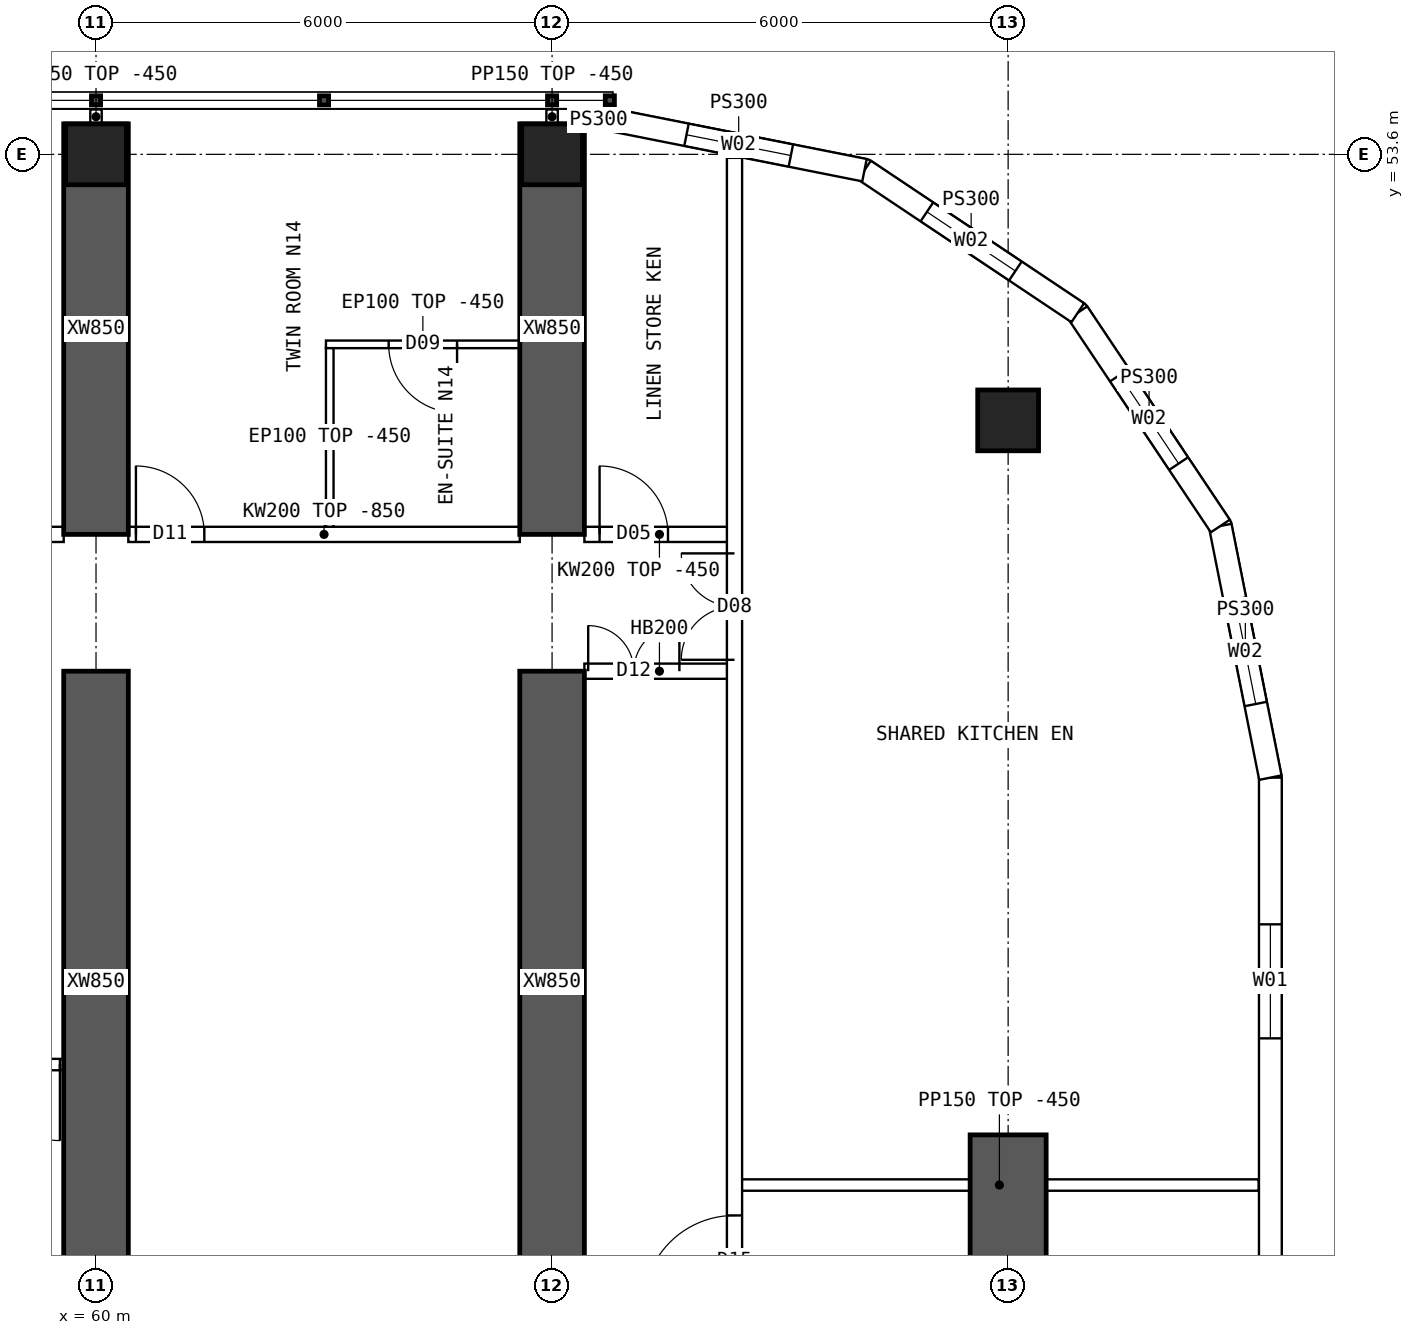
"""IFC4 building model, lengths in metres.
Left out: names, types, materials, properties, quantities, classifications, styles, units other than length and angle.
Written with IfcOpenShell. Run it as: python <this file> out.ifc"""

import sys

from ifc_helpers import new_model, si_unit, direction, frame, frame_2d, origin, origin_2d, place, context, subcontext, project, spatial, polyline, rectangle, hollow_rectangle, outline, extrude, element, fill, save


model = new_model("IFC4")
c1 = context("Model", 3, precision=1e-05, world=origin(), true_north=direction((0.0, 1.0)))
c2 = subcontext(c1, "Body", "Model", "MODEL_VIEW")
j1 = project(units=[si_unit("LENGTHUNIT", "METRE"), si_unit("PLANEANGLEUNIT", "RADIAN")], contexts=[c1])
p1 = place(None, origin())
s1 = spatial("IfcSite", under=j1, at=p1, CompositionType="ELEMENT")
p2 = place(p1, origin())
s2 = spatial("IfcBuilding", under=s1, at=p2, CompositionType="ELEMENT")
p3 = place(p2, frame((0.0, 0.0, 144.85)))
s3 = spatial("IfcBuildingStorey", under=s2, at=p3, CompositionType="ELEMENT", Elevation=144.85)
for number, where, z_axis, x_axis in (
    (1, (60.0, 53.6, 0.0), (0.0, 0.0, 1.0), (1.0, 0.0, 0.0)),
    (2, (66.0, 53.6, 0.0), (0.0, 0.0, 1.0), (1.0, 0.0, 0.0)),
    (3, (72.0, 50.1, 0.0), (0.0, 0.0, 1.0), (1.0, 0.0, 0.0)),
):
    element("IfcColumn", number, at=place(p3, frame(where, z_axis=z_axis, x_axis=x_axis)), inside=s3, PredefinedType="COLUMN", context=c2, shape_type="SweptSolid", body=[
        extrude(hollow_rectangle(XDim=0.8, YDim=0.8, WallThickness=0.08, at=origin_2d()), origin(), (0.0, 0.0, 1.0), 3.75),
    ])
p4 = place(p3, frame((72.0, 35.7, 0.0), z_axis=(0.0, 0.0, 1.0), x_axis=(0.0, 1.0, 0.0)))
e4 = element("IfcWall", 4, at=p4, inside=s3, PredefinedType="SHEAR", context=c2, shape_type="SweptSolid", body=[
    extrude(rectangle(XDim=5.0, YDim=1.0, at=frame_2d((2.5, 0.0))), origin(), (0.0, 0.0, 1.0), 3.75),
])
p5 = place(p3, frame((60.0, 48.6, 0.0), z_axis=(0.0, 0.0, 1.0), x_axis=(0.0, 1.0, 0.0)))
e5 = element("IfcWall", 5, at=p5, inside=s3, PredefinedType="SHEAR", context=c2, shape_type="SweptSolid", body=[
    extrude(rectangle(XDim=5.4, YDim=0.85, at=frame_2d((2.7, 0.0))), origin(), (0.0, 0.0, 1.0), 3.75),
])
p6 = place(p3, frame((60.0, 38.625, 0.0), z_axis=(0.0, 0.0, 1.0), x_axis=(0.0, 1.0, 0.0)))
e6 = element("IfcWall", 6, at=p6, inside=s3, PredefinedType="SHEAR", context=c2, shape_type="SweptSolid", body=[
    extrude(rectangle(XDim=8.175, YDim=0.85, at=frame_2d((4.087, 0.0))), origin(), (0.0, 0.0, 1.0), 3.75),
])
p7 = place(p3, frame((66.0, 48.6, 0.0), z_axis=(0.0, 0.0, 1.0), x_axis=(0.0, 1.0, 0.0)))
e7 = element("IfcWall", 7, at=p7, inside=s3, PredefinedType="SHEAR", context=c2, shape_type="SweptSolid", body=[
    extrude(rectangle(XDim=5.4, YDim=0.85, at=frame_2d((2.7, 0.0))), origin(), (0.0, 0.0, 1.0), 3.75),
])
p8 = place(p3, frame((66.0, 38.625, 0.0), z_axis=(0.0, 0.0, 1.0), x_axis=(0.0, 1.0, 0.0)))
e8 = element("IfcWall", 8, at=p8, inside=s3, PredefinedType="SHEAR", context=c2, shape_type="SweptSolid", body=[
    extrude(rectangle(XDim=8.175, YDim=0.85, at=frame_2d((4.087, 0.0))), origin(), (0.0, 0.0, 1.0), 3.75),
])
p9 = place(p3, frame((75.45, 18.6, 0.0), z_axis=(0.0, 0.0, 1.0), x_axis=(0.0, 1.0, 0.0)))
e9 = element("IfcWall", 9, at=p9, inside=s3, PredefinedType="SOLIDWALL", context=c2, shape_type="SweptSolid", body=[
    extrude(outline(polyline([(-0.015, -0.15), (26.815, -0.15), (26.785, 0.15), (0.015, 0.15), (-0.015, -0.15)])), origin(), (0.0, 0.0, 1.0), 3.3),
])
p10 = place(p9, frame((1.93, 0.0, 0.9)))
e10 = element("IfcOpeningElement", 10, at=p10, cuts=e9, PredefinedType="OPENING", context=c2, shape_type="SweptSolid", body=[
    extrude(rectangle(XDim=1.5, YDim=2.0, at=frame_2d((0.75, 1.0))), frame((0.0, 0.16, 0.0), z_axis=(0.0, -1.0, 0.0), x_axis=(1.0, 0.0, 0.0)), (0.0, 0.0, 1.0), 0.32),
])
p11 = place(p9, frame((7.29, 0.0, 0.9)))
e11 = element("IfcOpeningElement", 11, at=p11, cuts=e9, PredefinedType="OPENING", context=c2, shape_type="SweptSolid", body=[
    extrude(rectangle(XDim=1.5, YDim=2.0, at=frame_2d((0.75, 1.0))), frame((0.0, 0.16, 0.0), z_axis=(0.0, -1.0, 0.0), x_axis=(1.0, 0.0, 0.0)), (0.0, 0.0, 1.0), 0.32),
])
p12 = place(p9, frame((12.65, 0.0, 0.9)))
e12 = element("IfcOpeningElement", 12, at=p12, cuts=e9, PredefinedType="OPENING", context=c2, shape_type="SweptSolid", body=[
    extrude(rectangle(XDim=1.5, YDim=2.0, at=frame_2d((0.75, 1.0))), frame((0.0, 0.16, 0.0), z_axis=(0.0, -1.0, 0.0), x_axis=(1.0, 0.0, 0.0)), (0.0, 0.0, 1.0), 0.32),
])
p13 = place(p9, frame((18.01, 0.0, 0.9)))
e13 = element("IfcOpeningElement", 13, at=p13, cuts=e9, PredefinedType="OPENING", context=c2, shape_type="SweptSolid", body=[
    extrude(rectangle(XDim=1.5, YDim=2.0, at=frame_2d((0.75, 1.0))), frame((0.0, 0.16, 0.0), z_axis=(0.0, -1.0, 0.0), x_axis=(1.0, 0.0, 0.0)), (0.0, 0.0, 1.0), 0.32),
])
p14 = place(p9, frame((23.37, 0.0, 0.9)))
e14 = element("IfcOpeningElement", 14, at=p14, cuts=e9, PredefinedType="OPENING", context=c2, shape_type="SweptSolid", body=[
    extrude(rectangle(XDim=1.5, YDim=2.0, at=frame_2d((0.75, 1.0))), frame((0.0, 0.16, 0.0), z_axis=(0.0, -1.0, 0.0), x_axis=(1.0, 0.0, 0.0)), (0.0, 0.0, 1.0), 0.32),
])
p15 = place(p3, frame((75.45, 45.4, 0.0), z_axis=(0.0, 0.0, 1.0), x_axis=(-0.19508664885, 0.980786011034, 0.0)))
e15 = element("IfcWall", 15, at=p15, inside=s3, PredefinedType="SOLIDWALL", context=c2, shape_type="SweptSolid", body=[
    extrude(outline(polyline([(-0.015, -0.15), (3.405, -0.15), (3.345, 0.15), (0.015, 0.15), (-0.015, -0.15)])), origin(), (0.0, 0.0, 1.0), 3.3),
])
p16 = place(p15, frame((0.988, 0.0, 0.9)))
e16 = element("IfcOpeningElement", 16, at=p16, cuts=e15, PredefinedType="OPENING", context=c2, shape_type="SweptSolid", body=[
    extrude(rectangle(XDim=1.4, YDim=1.8, at=frame_2d((0.7, 0.9))), frame((0.0, 0.16, 0.0), z_axis=(0.0, -1.0, 0.0), x_axis=(1.0, 0.0, 0.0)), (0.0, 0.0, 1.0), 0.32),
])
p17 = place(p3, frame((74.792, 48.71, 0.0), z_axis=(0.0, 0.0, 1.0), x_axis=(-0.555534554399, 0.831493450887, 0.0)))
e17 = element("IfcWall", 17, at=p17, inside=s3, PredefinedType="SOLIDWALL", context=c2, shape_type="SweptSolid", body=[
    extrude(outline(polyline([(-0.03, -0.15), (3.405, -0.15), (3.345, 0.15), (0.03, 0.15), (-0.03, -0.15)])), origin(), (0.0, 0.0, 1.0), 3.3),
])
p18 = place(p17, frame((0.988, 0.0, 0.9)))
e18 = element("IfcOpeningElement", 18, at=p18, cuts=e17, PredefinedType="OPENING", context=c2, shape_type="SweptSolid", body=[
    extrude(rectangle(XDim=1.4, YDim=1.8, at=frame_2d((0.7, 0.9))), frame((0.0, 0.16, 0.0), z_axis=(0.0, -1.0, 0.0), x_axis=(1.0, 0.0, 0.0)), (0.0, 0.0, 1.0), 0.32),
])
p19 = place(p3, frame((72.917, 51.517, 0.0), z_axis=(0.0, 0.0, 1.0), x_axis=(-0.831493450887, 0.555534554399, 0.0)))
e19 = element("IfcWall", 19, at=p19, inside=s3, PredefinedType="SOLIDWALL", context=c2, shape_type="SweptSolid", body=[
    extrude(outline(polyline([(-0.03, -0.15), (3.405, -0.15), (3.345, 0.15), (0.03, 0.15), (-0.03, -0.15)])), origin(), (0.0, 0.0, 1.0), 3.3),
])
p20 = place(p19, frame((0.988, 0.0, 0.9)))
e20 = element("IfcOpeningElement", 20, at=p20, cuts=e19, PredefinedType="OPENING", context=c2, shape_type="SweptSolid", body=[
    extrude(rectangle(XDim=1.4, YDim=1.8, at=frame_2d((0.7, 0.9))), frame((0.0, 0.16, 0.0), z_axis=(0.0, -1.0, 0.0), x_axis=(1.0, 0.0, 0.0)), (0.0, 0.0, 1.0), 0.32),
])
p21 = place(p3, frame((70.11, 53.392, 0.0), z_axis=(0.0, 0.0, 1.0), x_axis=(-0.98078325777, 0.195100490205, 0.0)))
e21 = element("IfcWall", 21, at=p21, inside=s3, PredefinedType="SOLIDWALL", context=c2, shape_type="SweptSolid", body=[
    extrude(outline(polyline([(-0.03, -0.15), (3.405, -0.15), (3.345, 0.15), (0.03, 0.15), (-0.03, -0.15)])), origin(), (0.0, 0.0, 1.0), 3.3),
])
p22 = place(p21, frame((0.988, 0.0, 0.9)))
e22 = element("IfcOpeningElement", 22, at=p22, cuts=e21, PredefinedType="OPENING", context=c2, shape_type="SweptSolid", body=[
    extrude(rectangle(XDim=1.4, YDim=1.8, at=frame_2d((0.7, 0.9))), frame((0.0, 0.16, 0.0), z_axis=(0.0, -1.0, 0.0), x_axis=(1.0, 0.0, 0.0)), (0.0, 0.0, 1.0), 0.32),
])
p23 = place(p3, frame((66.8, 54.05, 0.0), z_axis=(0.0, 0.0, 1.0), x_axis=(-1.0, 0.0, 0.0)))
e23 = element("IfcWall", 23, at=p23, inside=s3, PredefinedType="SOLIDWALL", context=c2, shape_type="SweptSolid", body=[
    extrude(rectangle(XDim=0.375, YDim=0.3, at=frame_2d((0.188, 0.0))), origin(), (0.0, 0.0, 1.0), 3.3),
])
p24 = place(p3, frame((54.425, 48.6, 0.0), z_axis=(0.0, 0.0, 1.0), x_axis=(1.0, 0.0, 0.0)))
e24 = element("IfcWall", 24, at=p24, inside=s3, PredefinedType="SOLIDWALL", context=c2, shape_type="SweptSolid", body=[
    extrude(outline(polyline([(0.0, 0.0), (5.15, 0.0), (5.15, 2.9), (0.0, 2.9), (0.0, 0.0)])), frame((0.0, 0.1, 0.0), z_axis=(0.0, -1.0, 0.0), x_axis=(1.0, 0.0, 0.0)), (0.0, 0.0, 1.0), 0.2),
])
p25 = place(p24, frame((0.6, 0.0, 0.0)))
e25 = element("IfcOpeningElement", 25, at=p25, cuts=e24, PredefinedType="OPENING", context=c2, shape_type="SweptSolid", body=[
    extrude(rectangle(XDim=1.0, YDim=2.1, at=frame_2d((0.5, 1.05))), frame((0.0, 0.11, 0.0), z_axis=(0.0, -1.0, 0.0), x_axis=(1.0, 0.0, 0.0)), (0.0, 0.0, 1.0), 0.22),
])
p26 = place(p3, frame((60.425, 48.6, 0.0), z_axis=(0.0, 0.0, 1.0), x_axis=(1.0, 0.0, 0.0)))
e26 = element("IfcWall", 26, at=p26, inside=s3, PredefinedType="SOLIDWALL", context=c2, shape_type="SweptSolid", body=[
    extrude(outline(polyline([(0.0, 0.0), (5.15, 0.0), (5.15, 2.9), (0.0, 2.9), (0.0, 0.0)])), frame((0.0, 0.1, 0.0), z_axis=(0.0, -1.0, 0.0), x_axis=(1.0, 0.0, 0.0)), (0.0, 0.0, 1.0), 0.2),
])
p27 = place(p26, frame((0.1, 0.0, 0.0)))
e27 = element("IfcOpeningElement", 27, at=p27, cuts=e26, PredefinedType="OPENING", context=c2, shape_type="SweptSolid", body=[
    extrude(rectangle(XDim=0.9, YDim=2.1, at=frame_2d((0.45, 1.05))), frame((0.0, 0.11, 0.0), z_axis=(0.0, -1.0, 0.0), x_axis=(1.0, 0.0, 0.0)), (0.0, 0.0, 1.0), 0.22),
])
p28 = place(p3, frame((66.425, 48.6, 0.0), z_axis=(0.0, 0.0, 1.0), x_axis=(1.0, 0.0, 0.0)))
e28 = element("IfcWall", 28, at=p28, inside=s3, PredefinedType="SOLIDWALL", context=c2, shape_type="SweptSolid", body=[
    extrude(rectangle(XDim=1.975, YDim=0.2, at=frame_2d((0.987, 0.0))), origin(), (0.0, 0.0, 1.0), 3.3),
])
p29 = place(p28, frame((0.2, 0.0, 0.0)))
e29 = element("IfcOpeningElement", 29, at=p29, cuts=e28, PredefinedType="OPENING", context=c2, shape_type="SweptSolid", body=[
    extrude(rectangle(XDim=0.9, YDim=2.1, at=frame_2d((0.45, 1.05))), frame((0.0, 0.11, 0.0), z_axis=(0.0, -1.0, 0.0), x_axis=(1.0, 0.0, 0.0)), (0.0, 0.0, 1.0), 0.22),
])
p30 = place(p3, frame((66.425, 46.8, 0.0), z_axis=(0.0, 0.0, 1.0), x_axis=(1.0, 0.0, 0.0)))
e30 = element("IfcWall", 30, at=p30, inside=s3, PredefinedType="SOLIDWALL", context=c2, shape_type="SweptSolid", body=[
    extrude(rectangle(XDim=1.975, YDim=0.2, at=frame_2d((0.987, 0.0))), origin(), (0.0, 0.0, 1.0), 3.3),
])
p31 = place(p30, frame((0.05, 0.0, 0.0)))
e31 = element("IfcOpeningElement", 31, at=p31, cuts=e30, PredefinedType="OPENING", context=c2, shape_type="SweptSolid", body=[
    extrude(rectangle(XDim=1.2, YDim=2.1, at=frame_2d((0.6, 1.05))), frame((0.0, 0.11, 0.0), z_axis=(0.0, -1.0, 0.0), x_axis=(1.0, 0.0, 0.0)), (0.0, 0.0, 1.0), 0.22),
])
p32 = place(p3, frame((63.025, 51.1, 0.0), z_axis=(0.0, 0.0, 1.0), x_axis=(1.0, 0.0, 0.0)))
e32 = element("IfcWall", 32, at=p32, inside=s3, PredefinedType="PARTITIONING", context=c2, shape_type="SweptSolid", body=[
    extrude(rectangle(XDim=2.55, YDim=0.1, at=frame_2d((1.275, 0.0))), origin(), (0.0, 0.0, 1.0), 3.3),
])
p33 = place(p32, frame((0.825, 0.0, 0.0)))
e33 = element("IfcOpeningElement", 33, at=p33, cuts=e32, PredefinedType="OPENING", context=c2, shape_type="SweptSolid", body=[
    extrude(rectangle(XDim=0.9, YDim=2.1, at=frame_2d((0.45, 1.05))), frame((0.0, 0.06, 0.0), z_axis=(0.0, -1.0, 0.0), x_axis=(1.0, 0.0, 0.0)), (0.0, 0.0, 1.0), 0.12),
])
p34 = place(p3, frame((63.075, 51.05, 0.0), z_axis=(0.0, 0.0, 1.0), x_axis=(0.0, -1.0, 0.0)))
e34 = element("IfcWall", 34, at=p34, inside=s3, PredefinedType="PARTITIONING", context=c2, shape_type="SweptSolid", body=[
    extrude(outline(polyline([(0.0, 0.0), (2.35, 0.0), (2.35, 2.9), (2.302, 2.9), (2.3, 3.3), (0.0, 3.3), (0.0, 0.0)])), frame((0.0, 0.05, 0.0), z_axis=(0.0, -1.0, 0.0), x_axis=(1.0, 0.0, 0.0)), (0.0, 0.0, 1.0), 0.1),
])
p35 = place(p3, frame((59.925, 41.625, 0.0), z_axis=(0.0, 0.0, 1.0), x_axis=(-1.0, 0.0, 0.0)))
e35 = element("IfcWall", 35, at=p35, inside=s3, PredefinedType="PARTITIONING", context=c2, shape_type="SweptSolid", body=[
    extrude(rectangle(XDim=5.5, YDim=0.15, at=frame_2d((2.75, 0.0))), origin(), (0.0, 0.0, 1.0), 3.3),
])
p36 = place(p35, frame((0.4, 0.0, 0.0)))
e36 = element("IfcOpeningElement", 36, at=p36, cuts=e35, PredefinedType="OPENING", context=c2, shape_type="SweptSolid", body=[
    extrude(rectangle(XDim=1.0, YDim=2.1, at=frame_2d((0.5, 1.05))), frame((0.0, 0.085, 0.0), z_axis=(0.0, -1.0, 0.0), x_axis=(1.0, 0.0, 0.0)), (0.0, 0.0, 1.0), 0.17),
])
p37 = place(p3, frame((68.4, 10.446, 0.0), z_axis=(0.0, 0.0, 1.0), x_axis=(0.0, 1.0, 0.0)))
e37 = element("IfcWall", 37, at=p37, inside=s3, PredefinedType="SOLIDWALL", context=c2, shape_type="SweptSolid", body=[
    extrude(rectangle(XDim=43.107, YDim=0.2, at=frame_2d((21.554, 0.0))), origin(), (0.0, 0.0, 1.0), 3.3),
])
p38 = place(p37, frame((27.994, 0.0, 0.0)))
e38 = element("IfcOpeningElement", 38, at=p38, cuts=e37, PredefinedType="OPENING", context=c2, shape_type="SweptSolid", body=[
    extrude(rectangle(XDim=1.2, YDim=2.1, at=frame_2d((0.6, 1.05))), frame((0.0, 0.11, 0.0), z_axis=(0.0, -1.0, 0.0), x_axis=(1.0, 0.0, 0.0)), (0.0, 0.0, 1.0), 0.22),
])
p39 = place(p37, frame((5.104, 0.0, 0.0)))
e39 = element("IfcOpeningElement", 39, at=p39, cuts=e37, PredefinedType="OPENING", context=c2, shape_type="SweptSolid", body=[
    extrude(rectangle(XDim=1.4, YDim=2.1, at=frame_2d((0.7, 1.05))), frame((0.0, 0.11, 0.0), z_axis=(0.0, -1.0, 0.0), x_axis=(1.0, 0.0, 0.0)), (0.0, 0.0, 1.0), 0.22),
])
p40 = place(p37, frame((36.504, 0.0, 0.0)))
e40 = element("IfcOpeningElement", 40, at=p40, cuts=e37, PredefinedType="OPENING", context=c2, shape_type="SweptSolid", body=[
    extrude(rectangle(XDim=1.4, YDim=2.1, at=frame_2d((0.7, 1.05))), frame((0.0, 0.11, 0.0), z_axis=(0.0, -1.0, 0.0), x_axis=(1.0, 0.0, 0.0)), (0.0, 0.0, 1.0), 0.22),
])
p41 = place(p3, frame((68.475, 40.04, 0.0), z_axis=(0.0, 0.0, 1.0), x_axis=(1.0, 0.0, 0.0)))
e41 = element("IfcWall", 41, at=p41, inside=s3, PredefinedType="PARTITIONING", context=c2, shape_type="SweptSolid", body=[
    extrude(rectangle(XDim=6.82, YDim=0.15, at=frame_2d((3.41, 0.0))), origin(), (0.0, 0.0, 1.0), 3.3),
])
for number, where, z_axis, x_axis in (
    (42, (60.0, 54.0, 0.0), (0.0, 0.0, 1.0), (0.0, 1.0, 0.0)),
    (43, (66.0, 54.0, 0.0), (0.0, 0.0, 1.0), (0.0, 1.0, 0.0)),
):
    element("IfcWall", number, at=place(p3, frame(where, z_axis=z_axis, x_axis=x_axis)), inside=s3, PredefinedType="PARTITIONING", context=c2, shape_type="SweptSolid", body=[
        extrude(rectangle(XDim=0.19, YDim=0.15, at=frame_2d((0.095, 0.0))), origin(), (0.0, 0.0, 1.0), 3.3),
    ])
p42 = place(p14, origin())
e44 = element("IfcWindow", 44, at=p42, inside=s3, PartitioningType="SINGLE_PANEL", PredefinedType="WINDOW", context=c2, shape_type="SweptSolid", body=[
    extrude(rectangle(XDim=1.5, YDim=2.0, at=frame_2d((0.75, 1.0))), frame((0.0, 0.03, 0.0), z_axis=(0.0, -1.0, 0.0), x_axis=(1.0, 0.0, 0.0)), (0.0, 0.0, 1.0), 0.06),
])
fill(e14, e44)
p43 = place(p16, origin())
e45 = element("IfcWindow", 45, at=p43, inside=s3, PartitioningType="SINGLE_PANEL", PredefinedType="WINDOW", context=c2, shape_type="SweptSolid", body=[
    extrude(rectangle(XDim=1.4, YDim=1.8, at=frame_2d((0.7, 0.9))), frame((0.0, 0.03, 0.0), z_axis=(0.0, -1.0, 0.0), x_axis=(1.0, 0.0, 0.0)), (0.0, 0.0, 1.0), 0.06),
])
fill(e16, e45)
p44 = place(p18, origin())
e46 = element("IfcWindow", 46, at=p44, inside=s3, PartitioningType="SINGLE_PANEL", PredefinedType="WINDOW", context=c2, shape_type="SweptSolid", body=[
    extrude(rectangle(XDim=1.4, YDim=1.8, at=frame_2d((0.7, 0.9))), frame((0.0, 0.03, 0.0), z_axis=(0.0, -1.0, 0.0), x_axis=(1.0, 0.0, 0.0)), (0.0, 0.0, 1.0), 0.06),
])
fill(e18, e46)
p45 = place(p20, origin())
e47 = element("IfcWindow", 47, at=p45, inside=s3, PartitioningType="SINGLE_PANEL", PredefinedType="WINDOW", context=c2, shape_type="SweptSolid", body=[
    extrude(rectangle(XDim=1.4, YDim=1.8, at=frame_2d((0.7, 0.9))), frame((0.0, 0.03, 0.0), z_axis=(0.0, -1.0, 0.0), x_axis=(1.0, 0.0, 0.0)), (0.0, 0.0, 1.0), 0.06),
])
fill(e20, e47)
p46 = place(p22, origin())
e48 = element("IfcWindow", 48, at=p46, inside=s3, PartitioningType="SINGLE_PANEL", PredefinedType="WINDOW", context=c2, shape_type="SweptSolid", body=[
    extrude(rectangle(XDim=1.4, YDim=1.8, at=frame_2d((0.7, 0.9))), frame((0.0, 0.03, 0.0), z_axis=(0.0, -1.0, 0.0), x_axis=(1.0, 0.0, 0.0)), (0.0, 0.0, 1.0), 0.06),
])
fill(e22, e48)
p47 = place(p31, origin())
e49 = element("IfcDoor", 49, at=p47, inside=s3, OperationType="DOUBLE_DOOR_SINGLE_SWING", PredefinedType="DOOR", context=c2, shape_type="SweptSolid", body=[
    extrude(rectangle(XDim=1.2, YDim=2.1, at=frame_2d((0.6, 1.05))), frame((0.0, 0.025, 0.0), z_axis=(0.0, -1.0, 0.0), x_axis=(1.0, 0.0, 0.0)), (0.0, 0.0, 1.0), 0.05),
])
fill(e31, e49)
p48 = place(p33, origin())
e50 = element("IfcDoor", 50, at=p48, inside=s3, OperationType="SINGLE_SWING_RIGHT", PredefinedType="DOOR", context=c2, shape_type="SweptSolid", body=[
    extrude(rectangle(XDim=0.9, YDim=2.1, at=frame_2d((0.45, 1.05))), frame((0.0, 0.025, 0.0), z_axis=(0.0, -1.0, 0.0), x_axis=(1.0, 0.0, 0.0)), (0.0, 0.0, 1.0), 0.05),
])
fill(e33, e50)
p49 = place(p27, origin())
e51 = element("IfcDoor", 51, at=p49, inside=s3, OperationType="SINGLE_SWING_LEFT", PredefinedType="DOOR", context=c2, shape_type="SweptSolid", body=[
    extrude(rectangle(XDim=0.9, YDim=2.1, at=frame_2d((0.45, 1.05))), frame((0.0, 0.025, 0.0), z_axis=(0.0, -1.0, 0.0), x_axis=(1.0, 0.0, 0.0)), (0.0, 0.0, 1.0), 0.05),
])
fill(e27, e51)
p50 = place(p36, origin())
e52 = element("IfcDoor", 52, at=p50, inside=s3, OperationType="SINGLE_SWING_LEFT", PredefinedType="DOOR", context=c2, shape_type="SweptSolid", body=[
    extrude(rectangle(XDim=1.0, YDim=2.1, at=frame_2d((0.5, 1.05))), frame((0.0, 0.025, 0.0), z_axis=(0.0, -1.0, 0.0), x_axis=(1.0, 0.0, 0.0)), (0.0, 0.0, 1.0), 0.05),
])
fill(e36, e52)
p51 = place(p38, origin())
e53 = element("IfcDoor", 53, at=p51, inside=s3, OperationType="SINGLE_SWING_LEFT", PredefinedType="DOOR", context=c2, shape_type="SweptSolid", body=[
    extrude(rectangle(XDim=1.2, YDim=2.1, at=frame_2d((0.6, 1.05))), frame((0.0, 0.025, 0.0), z_axis=(0.0, -1.0, 0.0), x_axis=(1.0, 0.0, 0.0)), (0.0, 0.0, 1.0), 0.05),
])
fill(e38, e53)
p52 = place(p40, origin())
e54 = element("IfcDoor", 54, at=p52, inside=s3, OperationType="DOUBLE_DOOR_SINGLE_SWING", PredefinedType="DOOR", context=c2, shape_type="SweptSolid", body=[
    extrude(rectangle(XDim=1.4, YDim=2.1, at=frame_2d((0.7, 1.05))), frame((0.0, 0.025, 0.0), z_axis=(0.0, -1.0, 0.0), x_axis=(1.0, 0.0, 0.0)), (0.0, 0.0, 1.0), 0.05),
])
fill(e40, e54)
p53 = place(p29, origin())
e55 = element("IfcDoor", 55, at=p53, inside=s3, OperationType="SINGLE_SWING_LEFT", PredefinedType="DOOR", context=c2, shape_type="SweptSolid", body=[
    extrude(rectangle(XDim=0.9, YDim=2.1, at=frame_2d((0.45, 1.05))), frame((0.0, 0.025, 0.0), z_axis=(0.0, -1.0, 0.0), x_axis=(1.0, 0.0, 0.0)), (0.0, 0.0, 1.0), 0.05),
])
fill(e29, e55)
save(model, sys.argv[1])
